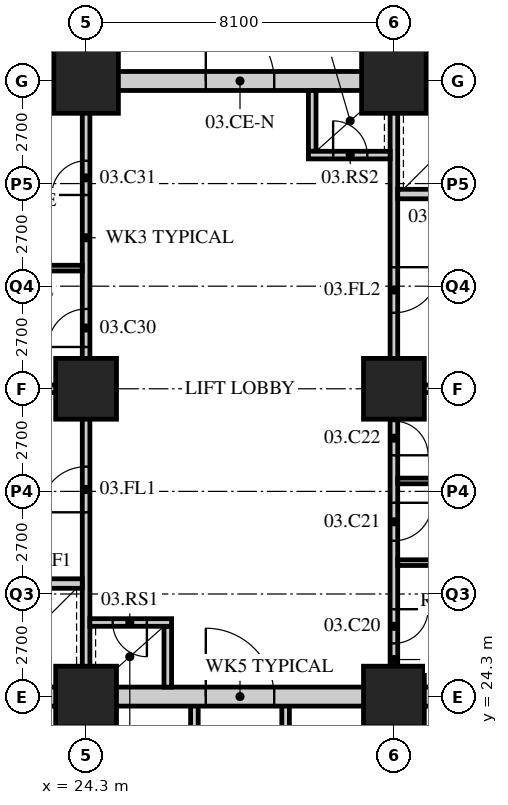
"""IFC4 building model, lengths in metres.
Left out: names, types, materials, properties, quantities, classifications, styles, units other than length and angle.
Written with IfcOpenShell. Run it as: python <this file> out.ifc"""

import sys

from ifc_helpers import new_model, si_unit, direction, frame, frame_2d, origin, origin_2d, place, context, subcontext, project, spatial, rectangle, hollow_rectangle, extrude, element, fill, save


model = new_model("IFC4")
c1 = context("Model", 3, precision=1e-05, world=origin(), true_north=direction((0.0, 1.0)))
c2 = subcontext(c1, "Body", "Model", "MODEL_VIEW")
j1 = project(units=[si_unit("LENGTHUNIT", "METRE"), si_unit("PLANEANGLEUNIT", "RADIAN")], contexts=[c1])
p1 = place(None, origin())
s1 = spatial("IfcSite", under=j1, at=p1, CompositionType="ELEMENT")
p2 = place(p1, origin())
s2 = spatial("IfcBuilding", under=s1, at=p2, CompositionType="ELEMENT")
p3 = place(p2, frame((0.0, 0.0, 16.8)))
s3 = spatial("IfcBuildingStorey", under=s2, at=p3, CompositionType="ELEMENT", Elevation=16.8)
for number, where, z_axis, x_axis in (
    (1, (24.3, 24.3, 0.0), (0.0, 0.0, 1.0), (1.0, 0.0, 0.0)),
    (2, (24.3, 32.4, 0.0), (0.0, 0.0, 1.0), (1.0, 0.0, 0.0)),
):
    element("IfcColumn", number, at=place(p3, frame(where, z_axis=z_axis, x_axis=x_axis)), inside=s3, PredefinedType="COLUMN", context=c2, shape_type="SweptSolid", body=[
        extrude(hollow_rectangle(XDim=1.6, YDim=1.6, WallThickness=0.15, at=origin_2d()), origin(), (0.0, 0.0, 1.0), 5.4),
    ])
p4 = place(p3, frame((24.3, 40.5, 0.0), z_axis=(0.0, 0.0, 1.0), x_axis=(1.0, 0.0, 0.0)))
e3 = element("IfcColumn", 3, at=p4, inside=s3, PredefinedType="COLUMN", context=c2, shape_type="SweptSolid", body=[
    extrude(hollow_rectangle(XDim=1.7, YDim=1.7, WallThickness=0.16, at=origin_2d()), origin(), (0.0, 0.0, 1.0), 5.4),
])
for number, where, z_axis, x_axis in (
    (4, (32.4, 24.3, 0.0), (0.0, 0.0, 1.0), (1.0, 0.0, 0.0)),
    (5, (32.4, 32.4, 0.0), (0.0, 0.0, 1.0), (1.0, 0.0, 0.0)),
):
    element("IfcColumn", number, at=place(p3, frame(where, z_axis=z_axis, x_axis=x_axis)), inside=s3, PredefinedType="COLUMN", context=c2, shape_type="SweptSolid", body=[
        extrude(hollow_rectangle(XDim=1.6, YDim=1.6, WallThickness=0.15, at=origin_2d()), origin(), (0.0, 0.0, 1.0), 5.4),
    ])
p5 = place(p3, frame((32.4, 40.5, 0.0), z_axis=(0.0, 0.0, 1.0), x_axis=(1.0, 0.0, 0.0)))
e6 = element("IfcColumn", 6, at=p5, inside=s3, PredefinedType="COLUMN", context=c2, shape_type="SweptSolid", body=[
    extrude(hollow_rectangle(XDim=1.7, YDim=1.7, WallThickness=0.16, at=origin_2d()), origin(), (0.0, 0.0, 1.0), 5.4),
])
for number, where, z_axis, x_axis in (
    (7, (27.15, 9.9, 0.0), (0.0, 0.0, 1.0), (0.0, 1.0, 0.0)),
    (8, (29.55, 9.9, 0.0), (0.0, 0.0, 1.0), (0.0, 1.0, 0.0)),
):
    element("IfcWall", number, at=place(p3, frame(where, z_axis=z_axis, x_axis=x_axis)), inside=s3, PredefinedType="SOLIDWALL", context=c2, shape_type="SweptSolid", body=[
        extrude(rectangle(XDim=14.4, YDim=0.2, at=frame_2d((7.2, 0.0))), origin(), (0.0, 0.0, 1.0), 5.15),
    ])
p6 = place(p3, frame((15.95, 24.3, 0.0), z_axis=(0.0, 0.0, 1.0), x_axis=(1.0, 0.0, 0.0)))
e9 = element("IfcWall", 9, at=p6, inside=s3, PredefinedType="SOLIDWALL", context=c2, shape_type="SweptSolid", body=[
    extrude(rectangle(XDim=24.8, YDim=0.5, at=frame_2d((12.4, 0.0))), origin(), (0.0, 0.0, 1.0), 4.5),
])
p7 = place(p6, frame((11.5, 0.0, 0.0)))
e10 = element("IfcOpeningElement", 10, at=p7, cuts=e9, PredefinedType="OPENING", context=c2, shape_type="SweptSolid", body=[
    extrude(rectangle(XDim=1.8, YDim=2.4, at=frame_2d((0.9, 1.2))), frame((0.0, 0.26, 0.0), z_axis=(0.0, -1.0, 0.0), x_axis=(1.0, 0.0, 0.0)), (0.0, 0.0, 1.0), 0.52),
])
p8 = place(p3, frame((15.95, 40.5, 0.0), z_axis=(0.0, 0.0, 1.0), x_axis=(1.0, 0.0, 0.0)))
e11 = element("IfcWall", 11, at=p8, inside=s3, PredefinedType="SOLIDWALL", context=c2, shape_type="SweptSolid", body=[
    extrude(rectangle(XDim=24.8, YDim=0.5, at=frame_2d((12.4, 0.0))), origin(), (0.0, 0.0, 1.0), 4.5),
])
p9 = place(p8, frame((11.5, 0.0, 0.0)))
e12 = element("IfcOpeningElement", 12, at=p9, cuts=e11, PredefinedType="OPENING", context=c2, shape_type="SweptSolid", body=[
    extrude(rectangle(XDim=1.8, YDim=2.4, at=frame_2d((0.9, 1.2))), frame((0.0, 0.26, 0.0), z_axis=(0.0, -1.0, 0.0), x_axis=(1.0, 0.0, 0.0)), (0.0, 0.0, 1.0), 0.52),
])
p10 = place(p3, frame((16.45, 32.4, 0.0), z_axis=(0.0, 0.0, 1.0), x_axis=(1.0, 0.0, 0.0)))
e13 = element("IfcWall", 13, at=p10, inside=s3, PredefinedType="SOLIDWALL", context=c2, shape_type="SweptSolid", body=[
    extrude(rectangle(XDim=7.95, YDim=0.2, at=frame_2d((3.975, 0.0))), origin(), (0.0, 0.0, 1.0), 4.45),
])
p11 = place(p3, frame((24.3, 24.55, 0.0), z_axis=(0.0, 0.0, 1.0), x_axis=(0.0, 1.0, 0.0)))
e14 = element("IfcWall", 14, at=p11, inside=s3, PredefinedType="SOLIDWALL", context=c2, shape_type="SweptSolid", body=[
    extrude(rectangle(XDim=7.75, YDim=0.2, at=frame_2d((3.875, 0.0))), origin(), (0.0, 0.0, 1.0), 4.45),
])
p12 = place(p11, frame((4.6, 0.0, 0.0)))
e15 = element("IfcOpeningElement", 15, at=p12, cuts=e14, PredefinedType="OPENING", context=c2, shape_type="SweptSolid", body=[
    extrude(rectangle(XDim=1.2, YDim=2.1, at=frame_2d((0.6, 1.05))), frame((0.0, 0.11, 0.0), z_axis=(0.0, -1.0, 0.0), x_axis=(1.0, 0.0, 0.0)), (0.0, 0.0, 1.0), 0.22),
])
p13 = place(p3, frame((21.25, 27.275, 0.0), z_axis=(0.0, 0.0, 1.0), x_axis=(1.0, 0.0, 0.0)))
e16 = element("IfcWall", 16, at=p13, inside=s3, PredefinedType="SOLIDWALL", context=c2, shape_type="SweptSolid", body=[
    extrude(rectangle(XDim=2.95, YDim=0.25, at=frame_2d((1.475, 0.0))), origin(), (0.0, 0.0, 1.0), 5.15),
])
p14 = place(p13, frame((0.95, 0.0, 0.0)))
e17 = element("IfcOpeningElement", 17, at=p14, cuts=e16, PredefinedType="OPENING", context=c2, shape_type="SweptSolid", body=[
    extrude(rectangle(XDim=1.1, YDim=2.4, at=frame_2d((0.55, 1.2))), frame((0.0, 0.135, 0.0), z_axis=(0.0, -1.0, 0.0), x_axis=(1.0, 0.0, 0.0)), (0.0, 0.0, 1.0), 0.27),
])
p15 = place(p3, frame((26.45, 24.55, 0.0), z_axis=(0.0, 0.0, 1.0), x_axis=(0.0, 1.0, 0.0)))
e18 = element("IfcWall", 18, at=p15, inside=s3, PredefinedType="SOLIDWALL", context=c2, shape_type="SweptSolid", body=[
    extrude(rectangle(XDim=1.6, YDim=0.2, at=frame_2d((0.8, 0.0))), origin(), (0.0, 0.0, 1.0), 5.15),
])
p16 = place(p3, frame((24.4, 26.25, 0.0), z_axis=(0.0, 0.0, 1.0), x_axis=(1.0, 0.0, 0.0)))
e19 = element("IfcWall", 19, at=p16, inside=s3, PredefinedType="SOLIDWALL", context=c2, shape_type="SweptSolid", body=[
    extrude(rectangle(XDim=2.15, YDim=0.2, at=frame_2d((1.075, 0.0))), origin(), (0.0, 0.0, 1.0), 5.15),
])
p17 = place(p16, frame((0.6, 0.0, 0.0)))
e20 = element("IfcOpeningElement", 20, at=p17, cuts=e19, PredefinedType="OPENING", context=c2, shape_type="SweptSolid", body=[
    extrude(rectangle(XDim=0.9, YDim=2.1, at=frame_2d((0.45, 1.05))), frame((0.0, 0.11, 0.0), z_axis=(0.0, -1.0, 0.0), x_axis=(1.0, 0.0, 0.0)), (0.0, 0.0, 1.0), 0.22),
])
p18 = place(p3, frame((32.3, 32.4, 0.0), z_axis=(0.0, 0.0, 1.0), x_axis=(1.0, 0.0, 0.0)))
e21 = element("IfcWall", 21, at=p18, inside=s3, PredefinedType="SOLIDWALL", context=c2, shape_type="SweptSolid", body=[
    extrude(rectangle(XDim=7.95, YDim=0.2, at=frame_2d((3.975, 0.0))), origin(), (0.0, 0.0, 1.0), 4.45),
])
p19 = place(p3, frame((32.4, 32.5, 0.0), z_axis=(0.0, 0.0, 1.0), x_axis=(0.0, 1.0, 0.0)))
e22 = element("IfcWall", 22, at=p19, inside=s3, PredefinedType="SOLIDWALL", context=c2, shape_type="SweptSolid", body=[
    extrude(rectangle(XDim=7.75, YDim=0.2, at=frame_2d((3.875, 0.0))), origin(), (0.0, 0.0, 1.0), 4.45),
])
p20 = place(p19, frame((1.9, 0.0, 0.0)))
e23 = element("IfcOpeningElement", 23, at=p20, cuts=e22, PredefinedType="OPENING", context=c2, shape_type="SweptSolid", body=[
    extrude(rectangle(XDim=1.2, YDim=2.1, at=frame_2d((0.6, 1.05))), frame((0.0, 0.11, 0.0), z_axis=(0.0, -1.0, 0.0), x_axis=(1.0, 0.0, 0.0)), (0.0, 0.0, 1.0), 0.22),
])
p21 = place(p3, frame((32.5, 37.525, 0.0), z_axis=(0.0, 0.0, 1.0), x_axis=(1.0, 0.0, 0.0)))
e24 = element("IfcWall", 24, at=p21, inside=s3, PredefinedType="SOLIDWALL", context=c2, shape_type="SweptSolid", body=[
    extrude(rectangle(XDim=2.95, YDim=0.25, at=frame_2d((1.475, 0.0))), origin(), (0.0, 0.0, 1.0), 5.15),
])
p22 = place(p21, frame((0.9, 0.0, 0.0)))
e25 = element("IfcOpeningElement", 25, at=p22, cuts=e24, PredefinedType="OPENING", context=c2, shape_type="SweptSolid", body=[
    extrude(rectangle(XDim=1.1, YDim=2.4, at=frame_2d((0.55, 1.2))), frame((0.0, 0.135, 0.0), z_axis=(0.0, -1.0, 0.0), x_axis=(1.0, 0.0, 0.0)), (0.0, 0.0, 1.0), 0.27),
])
p23 = place(p3, frame((30.25, 38.65, 0.0), z_axis=(0.0, 0.0, 1.0), x_axis=(0.0, 1.0, 0.0)))
e26 = element("IfcWall", 26, at=p23, inside=s3, PredefinedType="SOLIDWALL", context=c2, shape_type="SweptSolid", body=[
    extrude(rectangle(XDim=1.6, YDim=0.2, at=frame_2d((0.8, 0.0))), origin(), (0.0, 0.0, 1.0), 5.15),
])
p24 = place(p3, frame((30.15, 38.55, 0.0), z_axis=(0.0, 0.0, 1.0), x_axis=(1.0, 0.0, 0.0)))
e27 = element("IfcWall", 27, at=p24, inside=s3, PredefinedType="SOLIDWALL", context=c2, shape_type="SweptSolid", body=[
    extrude(rectangle(XDim=2.15, YDim=0.2, at=frame_2d((1.075, 0.0))), origin(), (0.0, 0.0, 1.0), 5.15),
])
p25 = place(p24, frame((0.65, 0.0, 0.0)))
e28 = element("IfcOpeningElement", 28, at=p25, cuts=e27, PredefinedType="OPENING", context=c2, shape_type="SweptSolid", body=[
    extrude(rectangle(XDim=0.9, YDim=2.1, at=frame_2d((0.45, 1.05))), frame((0.0, 0.11, 0.0), z_axis=(0.0, -1.0, 0.0), x_axis=(1.0, 0.0, 0.0)), (0.0, 0.0, 1.0), 0.22),
])
p26 = place(p3, frame((24.3, 32.5, 0.0), z_axis=(0.0, 0.0, 1.0), x_axis=(0.0, 1.0, 0.0)))
e29 = element("IfcWall", 29, at=p26, inside=s3, PredefinedType="PARTITIONING", context=c2, shape_type="SweptSolid", body=[
    extrude(rectangle(XDim=7.75, YDim=0.2, at=frame_2d((3.875, 0.0))), origin(), (0.0, 0.0, 1.0), 4.45),
])
p27 = place(p26, frame((1.0, 0.0, 0.0)))
e30 = element("IfcOpeningElement", 30, at=p27, cuts=e29, PredefinedType="OPENING", context=c2, shape_type="SweptSolid", body=[
    extrude(rectangle(XDim=1.0, YDim=2.1, at=frame_2d((0.5, 1.05))), frame((0.0, 0.11, 0.0), z_axis=(0.0, -1.0, 0.0), x_axis=(1.0, 0.0, 0.0)), (0.0, 0.0, 1.0), 0.22),
])
p28 = place(p26, frame((5.0, 0.0, 0.0)))
e31 = element("IfcOpeningElement", 31, at=p28, cuts=e29, PredefinedType="OPENING", context=c2, shape_type="SweptSolid", body=[
    extrude(rectangle(XDim=0.9, YDim=2.1, at=frame_2d((0.45, 1.05))), frame((0.0, 0.11, 0.0), z_axis=(0.0, -1.0, 0.0), x_axis=(1.0, 0.0, 0.0)), (0.0, 0.0, 1.0), 0.22),
])
p29 = place(p3, frame((19.3, 35.575, 0.0), z_axis=(0.0, 0.0, 1.0), x_axis=(1.0, 0.0, 0.0)))
e32 = element("IfcWall", 32, at=p29, inside=s3, PredefinedType="PARTITIONING", context=c2, shape_type="SweptSolid", body=[
    extrude(rectangle(XDim=4.9, YDim=0.15, at=frame_2d((2.45, 0.0))), origin(), (0.0, 0.0, 1.0), 5.15),
])
p30 = place(p3, frame((32.4, 24.55, 0.0), z_axis=(0.0, 0.0, 1.0), x_axis=(0.0, 1.0, 0.0)))
e33 = element("IfcWall", 33, at=p30, inside=s3, PredefinedType="PARTITIONING", context=c2, shape_type="SweptSolid", body=[
    extrude(rectangle(XDim=7.75, YDim=0.2, at=frame_2d((3.875, 0.0))), origin(), (0.0, 0.0, 1.0), 4.45),
])
p31 = place(p30, frame((1.15, 0.0, 0.0)))
e34 = element("IfcOpeningElement", 34, at=p31, cuts=e33, PredefinedType="OPENING", context=c2, shape_type="SweptSolid", body=[
    extrude(rectangle(XDim=0.9, YDim=2.1, at=frame_2d((0.45, 1.05))), frame((0.0, 0.11, 0.0), z_axis=(0.0, -1.0, 0.0), x_axis=(1.0, 0.0, 0.0)), (0.0, 0.0, 1.0), 0.22),
])
p32 = place(p30, frame((3.85, 0.0, 0.0)))
e35 = element("IfcOpeningElement", 35, at=p32, cuts=e33, PredefinedType="OPENING", context=c2, shape_type="SweptSolid", body=[
    extrude(rectangle(XDim=1.0, YDim=2.1, at=frame_2d((0.5, 1.05))), frame((0.0, 0.11, 0.0), z_axis=(0.0, -1.0, 0.0), x_axis=(1.0, 0.0, 0.0)), (0.0, 0.0, 1.0), 0.22),
])
p33 = place(p30, frame((6.1, 0.0, 0.0)))
e36 = element("IfcOpeningElement", 36, at=p33, cuts=e33, PredefinedType="OPENING", context=c2, shape_type="SweptSolid", body=[
    extrude(rectangle(XDim=0.9, YDim=2.1, at=frame_2d((0.45, 1.05))), frame((0.0, 0.11, 0.0), z_axis=(0.0, -1.0, 0.0), x_axis=(1.0, 0.0, 0.0)), (0.0, 0.0, 1.0), 0.22),
])
p34 = place(p3, frame((32.5, 27.825, 0.0), z_axis=(0.0, 0.0, 1.0), x_axis=(1.0, 0.0, 0.0)))
e37 = element("IfcWall", 37, at=p34, inside=s3, PredefinedType="PARTITIONING", context=c2, shape_type="SweptSolid", body=[
    extrude(rectangle(XDim=2.15, YDim=0.15, at=frame_2d((1.075, 0.0))), origin(), (0.0, 0.0, 1.0), 5.15),
])
p35 = place(p3, frame((32.5, 29.975, 0.0), z_axis=(0.0, 0.0, 1.0), x_axis=(1.0, 0.0, 0.0)))
e38 = element("IfcWall", 38, at=p35, inside=s3, PredefinedType="PARTITIONING", context=c2, shape_type="SweptSolid", body=[
    extrude(rectangle(XDim=4.9, YDim=0.15, at=frame_2d((2.45, 0.0))), origin(), (0.0, 0.0, 1.0), 5.15),
])
p36 = place(p27, origin())
e39 = element("IfcDoor", 39, at=p36, inside=s3, OperationType="SINGLE_SWING_LEFT", PredefinedType="DOOR", context=c2, shape_type="SweptSolid", body=[
    extrude(rectangle(XDim=1.0, YDim=2.1, at=frame_2d((0.5, 1.05))), frame((0.0, 0.025, 0.0), z_axis=(0.0, -1.0, 0.0), x_axis=(1.0, 0.0, 0.0)), (0.0, 0.0, 1.0), 0.05),
])
fill(e30, e39)
p37 = place(p28, origin())
e40 = element("IfcDoor", 40, at=p37, inside=s3, OperationType="SINGLE_SWING_LEFT", PredefinedType="DOOR", context=c2, shape_type="SweptSolid", body=[
    extrude(rectangle(XDim=0.9, YDim=2.1, at=frame_2d((0.45, 1.05))), frame((0.0, 0.025, 0.0), z_axis=(0.0, -1.0, 0.0), x_axis=(1.0, 0.0, 0.0)), (0.0, 0.0, 1.0), 0.05),
])
fill(e31, e40)
p38 = place(p31, origin())
e41 = element("IfcDoor", 41, at=p38, inside=s3, OperationType="SINGLE_SWING_LEFT", PredefinedType="DOOR", context=c2, shape_type="SweptSolid", body=[
    extrude(rectangle(XDim=0.9, YDim=2.1, at=frame_2d((0.45, 1.05))), frame((0.0, 0.025, 0.0), z_axis=(0.0, -1.0, 0.0), x_axis=(1.0, 0.0, 0.0)), (0.0, 0.0, 1.0), 0.05),
])
fill(e34, e41)
p39 = place(p32, origin())
e42 = element("IfcDoor", 42, at=p39, inside=s3, OperationType="SINGLE_SWING_LEFT", PredefinedType="DOOR", context=c2, shape_type="SweptSolid", body=[
    extrude(rectangle(XDim=1.0, YDim=2.1, at=frame_2d((0.5, 1.05))), frame((0.0, 0.025, 0.0), z_axis=(0.0, -1.0, 0.0), x_axis=(1.0, 0.0, 0.0)), (0.0, 0.0, 1.0), 0.05),
])
fill(e35, e42)
p40 = place(p33, origin())
e43 = element("IfcDoor", 43, at=p40, inside=s3, OperationType="SINGLE_SWING_RIGHT", PredefinedType="DOOR", context=c2, shape_type="SweptSolid", body=[
    extrude(rectangle(XDim=0.9, YDim=2.1, at=frame_2d((0.45, 1.05))), frame((0.0, 0.025, 0.0), z_axis=(0.0, -1.0, 0.0), x_axis=(1.0, 0.0, 0.0)), (0.0, 0.0, 1.0), 0.05),
])
fill(e36, e43)
p41 = place(p12, origin())
e44 = element("IfcDoor", 44, at=p41, inside=s3, OperationType="SINGLE_SWING_LEFT", PredefinedType="DOOR", context=c2, shape_type="SweptSolid", body=[
    extrude(rectangle(XDim=1.2, YDim=2.1, at=frame_2d((0.6, 1.05))), frame((0.0, 0.025, 0.0), z_axis=(0.0, -1.0, 0.0), x_axis=(1.0, 0.0, 0.0)), (0.0, 0.0, 1.0), 0.05),
])
fill(e15, e44)
p42 = place(p17, origin())
e45 = element("IfcDoor", 45, at=p42, inside=s3, OperationType="SINGLE_SWING_LEFT", PredefinedType="DOOR", context=c2, shape_type="SweptSolid", body=[
    extrude(rectangle(XDim=0.9, YDim=2.1, at=frame_2d((0.45, 1.05))), frame((0.0, 0.025, 0.0), z_axis=(0.0, -1.0, 0.0), x_axis=(1.0, 0.0, 0.0)), (0.0, 0.0, 1.0), 0.05),
])
fill(e20, e45)
p43 = place(p20, origin())
e46 = element("IfcDoor", 46, at=p43, inside=s3, OperationType="SINGLE_SWING_LEFT", PredefinedType="DOOR", context=c2, shape_type="SweptSolid", body=[
    extrude(rectangle(XDim=1.2, YDim=2.1, at=frame_2d((0.6, 1.05))), frame((0.0, 0.025, 0.0), z_axis=(0.0, -1.0, 0.0), x_axis=(1.0, 0.0, 0.0)), (0.0, 0.0, 1.0), 0.05),
])
fill(e23, e46)
p44 = place(p25, origin())
e47 = element("IfcDoor", 47, at=p44, inside=s3, OperationType="SINGLE_SWING_LEFT", PredefinedType="DOOR", context=c2, shape_type="SweptSolid", body=[
    extrude(rectangle(XDim=0.9, YDim=2.1, at=frame_2d((0.45, 1.05))), frame((0.0, 0.025, 0.0), z_axis=(0.0, -1.0, 0.0), x_axis=(1.0, 0.0, 0.0)), (0.0, 0.0, 1.0), 0.05),
])
fill(e28, e47)
p45 = place(p7, origin())
e48 = element("IfcDoor", 48, at=p45, inside=s3, OperationType="DOUBLE_DOOR_SINGLE_SWING", PredefinedType="DOOR", context=c2, shape_type="SweptSolid", body=[
    extrude(rectangle(XDim=1.8, YDim=2.4, at=frame_2d((0.9, 1.2))), frame((0.0, 0.025, 0.0), z_axis=(0.0, -1.0, 0.0), x_axis=(1.0, 0.0, 0.0)), (0.0, 0.0, 1.0), 0.05),
])
fill(e10, e48)
p46 = place(p9, origin())
e49 = element("IfcDoor", 49, at=p46, inside=s3, OperationType="DOUBLE_DOOR_SINGLE_SWING", PredefinedType="DOOR", context=c2, shape_type="SweptSolid", body=[
    extrude(rectangle(XDim=1.8, YDim=2.4, at=frame_2d((0.9, 1.2))), frame((0.0, 0.025, 0.0), z_axis=(0.0, -1.0, 0.0), x_axis=(1.0, 0.0, 0.0)), (0.0, 0.0, 1.0), 0.05),
])
fill(e12, e49)
save(model, sys.argv[1])
